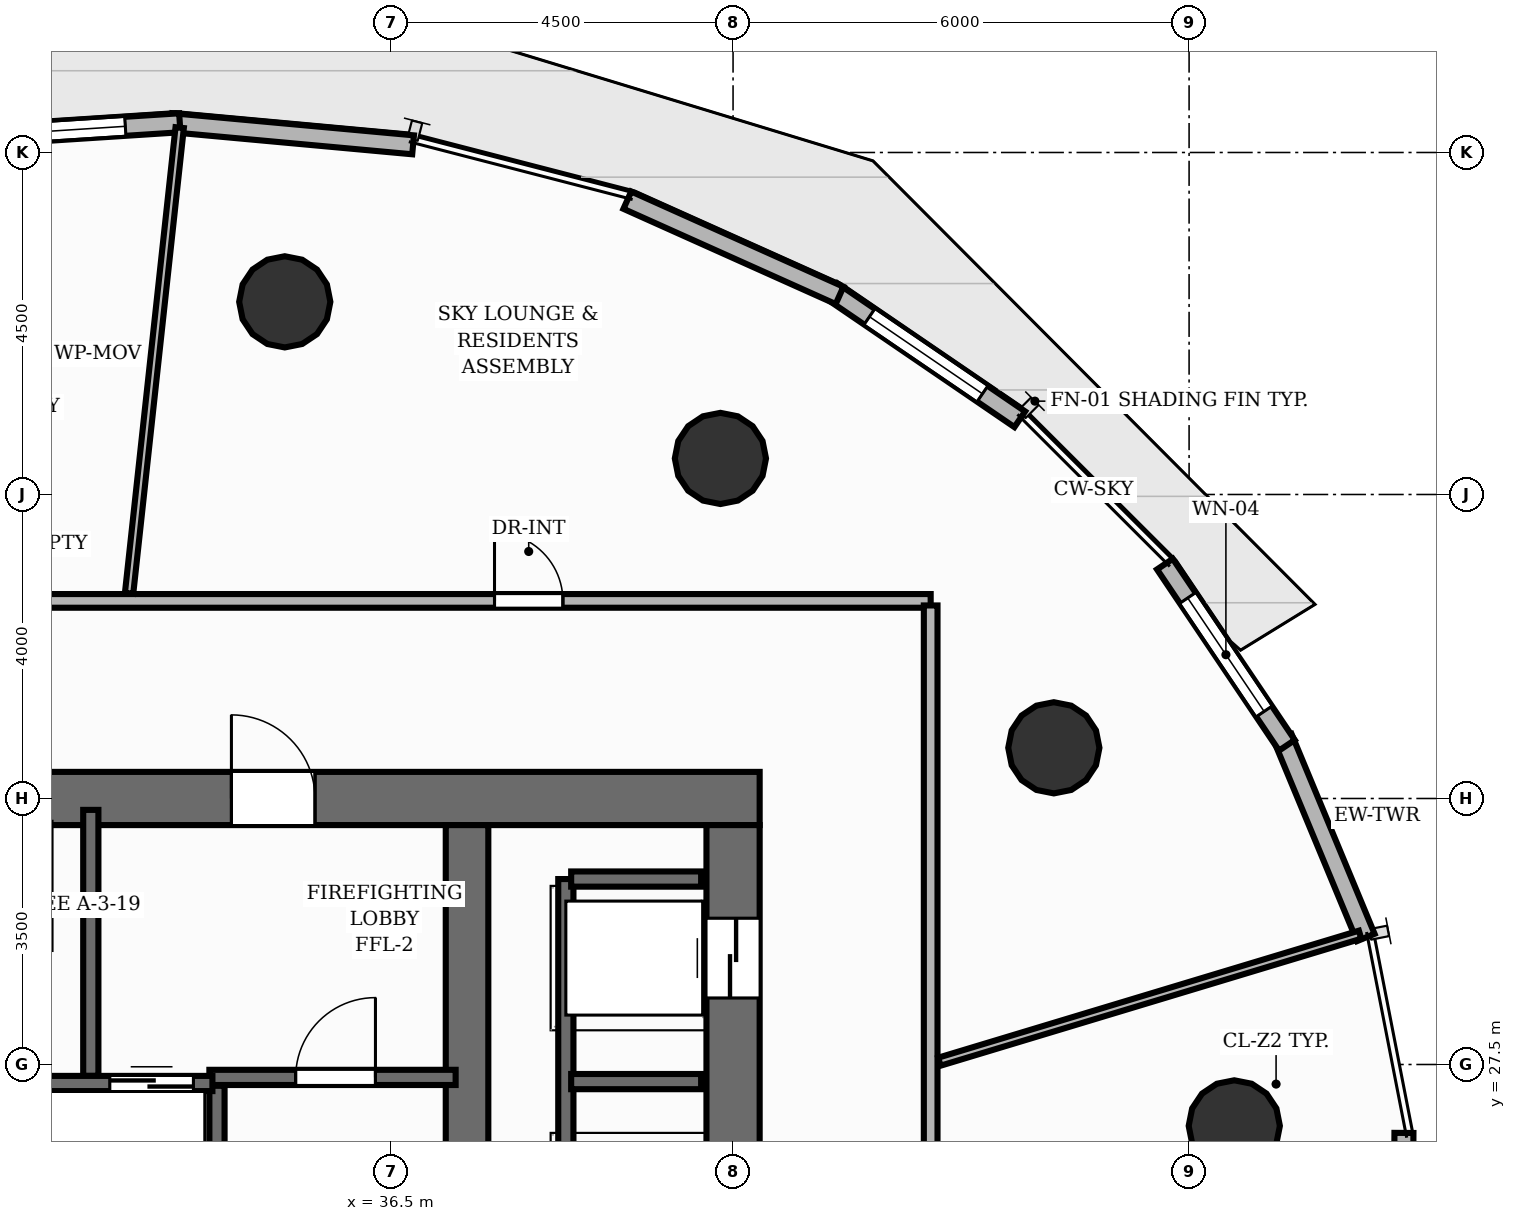
"""IFC4 building model, lengths in metres.
Left out: names, types, materials, properties, quantities, classifications, styles, units other than length and angle.
Written with IfcOpenShell. Run it as: python <this file> out.ifc"""

import sys

from ifc_helpers import new_model, si_unit, direction, frame, frame_2d, origin, origin_2d, place, context, subcontext, project, spatial, rectangle, circle, extrude, element, fill, save


model = new_model("IFC4")
c1 = context("Model", 3, precision=1e-05, world=origin(), true_north=direction((0.0, 1.0)))
c2 = subcontext(c1, "Body", "Model", "MODEL_VIEW")
j1 = project(units=[si_unit("LENGTHUNIT", "METRE"), si_unit("PLANEANGLEUNIT", "RADIAN")], contexts=[c1])
p1 = place(None, origin())
s1 = spatial("IfcSite", under=j1, at=p1, CompositionType="ELEMENT")
p2 = place(p1, origin())
s2 = spatial("IfcBuilding", under=s1, at=p2, CompositionType="ELEMENT")
p3 = place(p2, frame((0.0, 0.0, 70.88)))
s3 = spatial("IfcBuildingStorey", under=s2, at=p3, CompositionType="ELEMENT", Elevation=70.88)
p4 = place(p3, frame((22.65, 31.0, 0.0), z_axis=(0.0, 0.0, 1.0), x_axis=(1.0, 0.0, 0.0)))
e1 = element("IfcWall", 1, at=p4, inside=s3, PredefinedType="SHEAR", context=c2, shape_type="SweptSolid", body=[
    extrude(rectangle(XDim=18.7, YDim=0.7, at=frame_2d((9.35, 0.0))), origin(), (0.0, 0.0, 1.0), 3.2),
])
p5 = place(p4, frame((11.75, 0.0, 0.0)))
e2 = element("IfcOpeningElement", 2, at=p5, cuts=e1, PredefinedType="OPENING", context=c2, shape_type="SweptSolid", body=[
    extrude(rectangle(XDim=1.1, YDim=2.15, at=frame_2d((0.55, 1.075))), frame((0.0, 0.36, 0.0), z_axis=(0.0, -1.0, 0.0), x_axis=(1.0, 0.0, 0.0)), (0.0, 0.0, 1.0), 0.72),
])
p6 = place(p3, frame((41.0, 17.35, 0.0), z_axis=(0.0, 0.0, 1.0), x_axis=(0.0, 1.0, 0.0)))
e3 = element("IfcWall", 3, at=p6, inside=s3, PredefinedType="SHEAR", context=c2, shape_type="SweptSolid", body=[
    extrude(rectangle(XDim=13.3, YDim=0.7, at=frame_2d((6.65, 0.0))), origin(), (0.0, 0.0, 1.0), 3.2),
])
p7 = place(p6, frame((1.225, 0.0, 0.0)))
e4 = element("IfcOpeningElement", 4, at=p7, cuts=e3, PredefinedType="OPENING", context=c2, shape_type="SweptSolid", body=[
    extrude(rectangle(XDim=1.05, YDim=2.15, at=frame_2d((0.525, 1.075))), frame((0.0, 0.36, 0.0), z_axis=(0.0, -1.0, 0.0), x_axis=(1.0, 0.0, 0.0)), (0.0, 0.0, 1.0), 0.72),
])
p8 = place(p6, frame((4.475, 0.0, 0.0)))
e5 = element("IfcOpeningElement", 5, at=p8, cuts=e3, PredefinedType="OPENING", context=c2, shape_type="SweptSolid", body=[
    extrude(rectangle(XDim=1.05, YDim=2.15, at=frame_2d((0.525, 1.075))), frame((0.0, 0.36, 0.0), z_axis=(0.0, -1.0, 0.0), x_axis=(1.0, 0.0, 0.0)), (0.0, 0.0, 1.0), 0.72),
])
p9 = place(p6, frame((7.775, 0.0, 0.0)))
e6 = element("IfcOpeningElement", 6, at=p9, cuts=e3, PredefinedType="OPENING", context=c2, shape_type="SweptSolid", body=[
    extrude(rectangle(XDim=1.05, YDim=2.15, at=frame_2d((0.525, 1.075))), frame((0.0, 0.36, 0.0), z_axis=(0.0, -1.0, 0.0), x_axis=(1.0, 0.0, 0.0)), (0.0, 0.0, 1.0), 0.72),
])
p10 = place(p6, frame((11.025, 0.0, 0.0)))
e7 = element("IfcOpeningElement", 7, at=p10, cuts=e3, PredefinedType="OPENING", context=c2, shape_type="SweptSolid", body=[
    extrude(rectangle(XDim=1.05, YDim=2.15, at=frame_2d((0.525, 1.075))), frame((0.0, 0.36, 0.0), z_axis=(0.0, -1.0, 0.0), x_axis=(1.0, 0.0, 0.0)), (0.0, 0.0, 1.0), 0.72),
])
p11 = place(p3, frame((37.5, 17.35, 0.0), z_axis=(0.0, 0.0, 1.0), x_axis=(0.0, 1.0, 0.0)))
e8 = element("IfcWall", 8, at=p11, inside=s3, PredefinedType="SHEAR", context=c2, shape_type="SweptSolid", body=[
    extrude(rectangle(XDim=13.3, YDim=0.56, at=frame_2d((6.65, 0.0))), origin(), (0.0, 0.0, 1.0), 3.2),
])
for number, where, z_axis, x_axis in (
    (9, (47.594, 26.692, 0.0), (0.0, 0.0, 1.0), (1.0, 0.0, 0.0)),
    (10, (45.22, 31.667, 0.0), (0.0, 0.0, 1.0), (1.0, 0.0, 0.0)),
    (11, (40.833, 35.474, 0.0), (0.0, 0.0, 1.0), (1.0, 0.0, 0.0)),
    (12, (35.102, 37.535, 0.0), (0.0, 0.0, 1.0), (1.0, 0.0, 0.0)),
):
    element("IfcColumn", number, at=place(p3, frame(where, z_axis=z_axis, x_axis=x_axis)), inside=s3, PredefinedType="COLUMN", context=c2, shape_type="SweptSolid", body=[
        extrude(circle(Radius=0.6, at=origin_2d()), origin(), (0.0, 0.0, 1.0), 3.2),
    ])
p12 = place(p3, frame((48.233, 31.801, 0.0), z_axis=(0.0, 0.0, 1.0), x_axis=(0.383525326811, -0.923530358838, 0.0)))
e13 = element("IfcWall", 13, at=p12, inside=s3, PredefinedType="SOLIDWALL", context=c2, shape_type="SweptSolid", body=[
    extrude(rectangle(XDim=2.847, YDim=0.25, at=frame_2d((1.424, 0.0))), origin(), (0.0, 0.0, 1.0), 2.96),
])
p13 = place(p3, frame((46.682, 34.084, 0.0), z_axis=(0.0, 0.0, 1.0), x_axis=(0.558458439807, -0.829532501478, 0.0)))
e14 = element("IfcWall", 14, at=p13, inside=s3, PredefinedType="SOLIDWALL", context=c2, shape_type="SweptSolid", body=[
    extrude(rectangle(XDim=2.874, YDim=0.25, at=frame_2d((1.437, 0.0))), origin(), (0.0, 0.0, 1.0), 2.96),
])
p14 = place(p13, frame((0.537, 0.0, 0.85)))
e15 = element("IfcOpeningElement", 15, at=p14, cuts=e14, PredefinedType="OPENING", context=c2, shape_type="SweptSolid", body=[
    extrude(rectangle(XDim=1.8, YDim=1.37, at=frame_2d((0.9, 0.685))), frame((0.0, 0.135, 0.0), z_axis=(0.0, -1.0, 0.0), x_axis=(1.0, 0.0, 0.0)), (0.0, 0.0, 1.0), 0.27),
])
p15 = place(p3, frame((42.304, 37.674, 0.0), z_axis=(0.0, 0.0, 1.0), x_axis=(0.825967987646, -0.56371702421, 0.0)))
e16 = element("IfcWall", 16, at=p15, inside=s3, PredefinedType="SOLIDWALL", context=c2, shape_type="SweptSolid", body=[
    extrude(rectangle(XDim=2.988, YDim=0.25, at=frame_2d((1.494, 0.0))), origin(), (0.0, 0.0, 1.0), 2.96),
])
p16 = place(p15, frame((0.594, 0.0, 0.85)))
e17 = element("IfcOpeningElement", 17, at=p16, cuts=e16, PredefinedType="OPENING", context=c2, shape_type="SweptSolid", body=[
    extrude(rectangle(XDim=1.8, YDim=2.0, at=frame_2d((0.9, 1.0))), frame((0.0, 0.135, 0.0), z_axis=(0.0, -1.0, 0.0), x_axis=(1.0, 0.0, 0.0)), (0.0, 0.0, 1.0), 0.27),
])
p17 = place(p3, frame((39.609, 38.873, 0.0), z_axis=(0.0, 0.0, 1.0), x_axis=(0.912401485772, -0.40929638254, 0.0)))
e18 = element("IfcWall", 18, at=p17, inside=s3, PredefinedType="SOLIDWALL", context=c2, shape_type="SweptSolid", body=[
    extrude(rectangle(XDim=3.061, YDim=0.25, at=frame_2d((1.53, 0.0))), origin(), (0.0, 0.0, 1.0), 2.96),
])
p18 = place(p3, frame((33.612, 39.892, 0.0), z_axis=(0.0, 0.0, 1.0), x_axis=(0.9958277433, -0.091252976247, 0.0)))
e19 = element("IfcWall", 19, at=p18, inside=s3, PredefinedType="SOLIDWALL", context=c2, shape_type="SweptSolid", body=[
    extrude(rectangle(XDim=3.192, YDim=0.25, at=frame_2d((1.596, 0.0))), origin(), (0.0, 0.0, 1.0), 2.96),
])
p19 = place(p3, frame((30.491, 39.682, 0.0), z_axis=(0.0, 0.0, 1.0), x_axis=(0.997907602465, 0.064656143896, 0.0)))
e20 = element("IfcWall", 20, at=p19, inside=s3, PredefinedType="SOLIDWALL", context=c2, shape_type="SweptSolid", body=[
    extrude(rectangle(XDim=3.236, YDim=0.25, at=frame_2d((1.618, 0.0))), origin(), (0.0, 0.0, 1.0), 2.96),
])
p20 = place(p19, frame((0.718, 0.0, 0.85)))
e21 = element("IfcOpeningElement", 21, at=p20, cuts=e20, PredefinedType="OPENING", context=c2, shape_type="SweptSolid", body=[
    extrude(rectangle(XDim=1.8, YDim=2.0, at=frame_2d((0.9, 1.0))), frame((0.0, 0.135, 0.0), z_axis=(0.0, -1.0, 0.0), x_axis=(1.0, 0.0, 0.0)), (0.0, 0.0, 1.0), 0.27),
])
p21 = place(p3, frame((49.827, 26.6, 0.0), z_axis=(0.0, 0.0, 1.0), x_axis=(-0.006201036057, -0.999980773391, 0.0)))
e22 = element("IfcWall", 22, at=p21, inside=s3, PredefinedType="SOLIDWALL", context=c2, shape_type="SweptSolid", body=[
    extrude(rectangle(XDim=2.874, YDim=0.25, at=frame_2d((1.437, 0.0))), origin(), (0.0, 0.0, 1.0), 2.96),
])
p22 = place(p3, frame((34.21, 20.78, 0.0), z_axis=(0.0, 0.0, 1.0), x_axis=(0.0, 1.0, 0.0)))
e23 = element("IfcWall", 23, at=p22, inside=s3, PredefinedType="SHEAR", context=c2, shape_type="SweptSolid", body=[
    extrude(rectangle(XDim=6.44, YDim=0.2, at=frame_2d((3.22, 0.0))), origin(), (0.0, 0.0, 1.0), 3.2),
])
p23 = place(p3, frame((34.11, 27.33, 0.0), z_axis=(0.0, 0.0, 1.0), x_axis=(1.0, 0.0, 0.0)))
e24 = element("IfcWall", 24, at=p23, inside=s3, PredefinedType="SHEAR", context=c2, shape_type="SweptSolid", body=[
    extrude(rectangle(XDim=3.24, YDim=0.2, at=frame_2d((1.62, 0.0))), origin(), (0.0, 0.0, 1.0), 3.2),
])
p24 = place(p23, frame((1.135, 0.0, 0.0)))
e25 = element("IfcOpeningElement", 25, at=p24, cuts=e24, PredefinedType="OPENING", context=c2, shape_type="SweptSolid", body=[
    extrude(rectangle(XDim=1.05, YDim=2.15, at=frame_2d((0.525, 1.075))), frame((0.0, 0.11, 0.0), z_axis=(0.0, -1.0, 0.0), x_axis=(1.0, 0.0, 0.0)), (0.0, 0.0, 1.0), 0.22),
])
p25 = place(p3, frame((32.55, 27.35, 0.0), z_axis=(0.0, 0.0, 1.0), x_axis=(0.0, 1.0, 0.0)))
e26 = element("IfcWall", 26, at=p25, inside=s3, PredefinedType="SHEAR", context=c2, shape_type="SweptSolid", body=[
    extrude(rectangle(XDim=3.5, YDim=0.2, at=frame_2d((1.75, 0.0))), origin(), (0.0, 0.0, 1.0), 3.2),
])
p26 = place(p3, frame((31.85, 27.25, 0.0), z_axis=(0.0, 0.0, 1.0), x_axis=(1.0, 0.0, 0.0)))
e27 = element("IfcWall", 27, at=p26, inside=s3, PredefinedType="SHEAR", context=c2, shape_type="SweptSolid", body=[
    extrude(rectangle(XDim=2.3, YDim=0.2, at=frame_2d((1.15, 0.0))), origin(), (0.0, 0.0, 1.0), 3.2),
])
p27 = place(p26, frame((0.95, 0.0, 0.0)))
e28 = element("IfcOpeningElement", 28, at=p27, cuts=e27, PredefinedType="OPENING", context=c2, shape_type="SweptSolid", body=[
    extrude(rectangle(XDim=1.1, YDim=2.15, at=frame_2d((0.55, 1.075))), frame((0.0, 0.11, 0.0), z_axis=(0.0, -1.0, 0.0), x_axis=(1.0, 0.0, 0.0)), (0.0, 0.0, 1.0), 0.22),
])
p28 = place(p3, frame((38.8, 18.06, 0.0), z_axis=(0.0, 0.0, 1.0), x_axis=(0.0, 1.0, 0.0)))
e29 = element("IfcWall", 29, at=p28, inside=s3, PredefinedType="SHEAR", context=c2, shape_type="SweptSolid", body=[
    extrude(rectangle(XDim=11.88, YDim=0.2, at=frame_2d((5.94, 0.0))), origin(), (0.0, 0.0, 1.0), 3.2),
])
for number, where, z_axis, x_axis in (
    (30, (38.87, 29.94, 0.0), (0.0, 0.0, 1.0), (1.0, 0.0, 0.0)),
    (31, (38.87, 27.275, 0.0), (0.0, 0.0, 1.0), (1.0, 0.0, 0.0)),
):
    element("IfcWall", number, at=place(p3, frame(where, z_axis=z_axis, x_axis=x_axis)), inside=s3, PredefinedType="SHEAR", context=c2, shape_type="SweptSolid", body=[
        extrude(rectangle(XDim=1.71, YDim=0.2, at=frame_2d((0.855, 0.0))), origin(), (0.0, 0.0, 1.0), 3.2),
    ])
p29 = place(p3, frame((20.4, 33.6, 0.0), z_axis=(0.0, 0.0, 1.0), x_axis=(1.0, 0.0, 0.0)))
e32 = element("IfcWall", 32, at=p29, inside=s3, PredefinedType="PARTITIONING", context=c2, shape_type="SweptSolid", body=[
    extrude(rectangle(XDim=23.2, YDim=0.18, at=frame_2d((11.6, 0.0))), origin(), (0.0, 0.0, 1.0), 2.955),
])
p30 = place(p29, frame((17.461, 0.0, 0.0)))
e33 = element("IfcOpeningElement", 33, at=p30, cuts=e32, PredefinedType="OPENING", context=c2, shape_type="SweptSolid", body=[
    extrude(rectangle(XDim=0.9, YDim=2.1, at=frame_2d((0.45, 1.05))), frame((0.0, 0.1, 0.0), z_axis=(0.0, -1.0, 0.0), x_axis=(1.0, 0.0, 0.0)), (0.0, 0.0, 1.0), 0.2),
])
p31 = place(p29, frame((5.882, 0.0, 0.0)))
e34 = element("IfcOpeningElement", 34, at=p31, cuts=e32, PredefinedType="OPENING", context=c2, shape_type="SweptSolid", body=[
    extrude(rectangle(XDim=0.9, YDim=2.1, at=frame_2d((0.45, 1.05))), frame((0.0, 0.1, 0.0), z_axis=(0.0, -1.0, 0.0), x_axis=(1.0, 0.0, 0.0)), (0.0, 0.0, 1.0), 0.2),
])
p32 = place(p3, frame((43.6, 33.54, 0.0), z_axis=(0.0, 0.0, 1.0), x_axis=(0.0, -1.0, 0.0)))
e35 = element("IfcWall", 35, at=p32, inside=s3, PredefinedType="PARTITIONING", context=c2, shape_type="SweptSolid", body=[
    extrude(rectangle(XDim=19.14, YDim=0.18, at=frame_2d((9.57, 0.0))), origin(), (0.0, 0.0, 1.0), 2.955),
])
p33 = place(p32, frame((12.128, 0.0, 0.0)))
e36 = element("IfcOpeningElement", 36, at=p33, cuts=e35, PredefinedType="OPENING", context=c2, shape_type="SweptSolid", body=[
    extrude(rectangle(XDim=0.9, YDim=2.1, at=frame_2d((0.45, 1.05))), frame((0.0, 0.1, 0.0), z_axis=(0.0, -1.0, 0.0), x_axis=(1.0, 0.0, 0.0)), (0.0, 0.0, 1.0), 0.2),
])
p34 = place(p3, frame((33.054, 33.699, 0.0), z_axis=(0.0, 0.0, 1.0), x_axis=(0.108014076948, 0.994149364623, 0.0)))
e37 = element("IfcWall", 37, at=p34, inside=s3, PredefinedType="MOVABLE", context=c2, shape_type="SweptSolid", body=[
    extrude(rectangle(XDim=6.164, YDim=0.11, at=frame_2d((3.082, 0.0))), origin(), (0.0, 0.0, 1.0), 2.955),
])
p35 = place(p3, frame((49.25, 29.208, 0.0), z_axis=(0.0, 0.0, 1.0), x_axis=(-0.957320436523, -0.289028686838, 0.0)))
e38 = element("IfcWall", 38, at=p35, inside=s3, PredefinedType="MOVABLE", context=c2, shape_type="SweptSolid", body=[
    extrude(rectangle(XDim=5.782, YDim=0.11, at=frame_2d((2.891, 0.0))), origin(), (0.0, 0.0, 1.0), 2.642),
])
p36 = place(p14, origin())
e39 = element("IfcWindow", 39, at=p36, inside=s3, PartitioningType="SINGLE_PANEL", PredefinedType="WINDOW", context=c2, shape_type="SweptSolid", body=[
    extrude(rectangle(XDim=1.8, YDim=1.37, at=frame_2d((0.9, 0.685))), frame((0.0, 0.03, 0.0), z_axis=(0.0, -1.0, 0.0), x_axis=(1.0, 0.0, 0.0)), (0.0, 0.0, 1.0), 0.06),
])
fill(e15, e39)
p37 = place(p16, origin())
e40 = element("IfcWindow", 40, at=p37, inside=s3, PartitioningType="SINGLE_PANEL", PredefinedType="WINDOW", context=c2, shape_type="SweptSolid", body=[
    extrude(rectangle(XDim=1.8, YDim=2.0, at=frame_2d((0.9, 1.0))), frame((0.0, 0.03, 0.0), z_axis=(0.0, -1.0, 0.0), x_axis=(1.0, 0.0, 0.0)), (0.0, 0.0, 1.0), 0.06),
])
fill(e17, e40)
p38 = place(p20, origin())
e41 = element("IfcWindow", 41, at=p38, inside=s3, PartitioningType="SINGLE_PANEL", PredefinedType="WINDOW", context=c2, shape_type="SweptSolid", body=[
    extrude(rectangle(XDim=1.8, YDim=2.0, at=frame_2d((0.9, 1.0))), frame((0.0, 0.03, 0.0), z_axis=(0.0, -1.0, 0.0), x_axis=(1.0, 0.0, 0.0)), (0.0, 0.0, 1.0), 0.06),
])
fill(e21, e41)
p39 = place(p24, origin())
e42 = element("IfcDoor", 42, at=p39, inside=s3, OperationType="SINGLE_SWING_RIGHT", PredefinedType="DOOR", context=c2, shape_type="SweptSolid", body=[
    extrude(rectangle(XDim=1.05, YDim=2.15, at=frame_2d((0.525, 1.075))), frame((0.0, 0.025, 0.0), z_axis=(0.0, -1.0, 0.0), x_axis=(1.0, 0.0, 0.0)), (0.0, 0.0, 1.0), 0.05),
])
fill(e25, e42)
p40 = place(p5, origin())
e43 = element("IfcDoor", 43, at=p40, inside=s3, OperationType="SINGLE_SWING_LEFT", PredefinedType="DOOR", context=c2, shape_type="SweptSolid", body=[
    extrude(rectangle(XDim=1.1, YDim=2.15, at=frame_2d((0.55, 1.075))), frame((0.0, 0.025, 0.0), z_axis=(0.0, -1.0, 0.0), x_axis=(1.0, 0.0, 0.0)), (0.0, 0.0, 1.0), 0.05),
])
fill(e2, e43)
p41 = place(p27, origin())
e44 = element("IfcDoor", 44, at=p41, inside=s3, OperationType="DOUBLE_DOOR_SLIDING", PredefinedType="DOOR", context=c2, shape_type="SweptSolid", body=[
    extrude(rectangle(XDim=1.1, YDim=2.15, at=frame_2d((0.55, 1.075))), frame((0.0, 0.025, 0.0), z_axis=(0.0, -1.0, 0.0), x_axis=(1.0, 0.0, 0.0)), (0.0, 0.0, 1.0), 0.05),
])
fill(e28, e44)
p42 = place(p10, origin())
e45 = element("IfcDoor", 45, at=p42, inside=s3, OperationType="DOUBLE_DOOR_SLIDING", PredefinedType="DOOR", context=c2, shape_type="SweptSolid", body=[
    extrude(rectangle(XDim=1.05, YDim=2.15, at=frame_2d((0.525, 1.075))), frame((0.0, 0.025, 0.0), z_axis=(0.0, -1.0, 0.0), x_axis=(1.0, 0.0, 0.0)), (0.0, 0.0, 1.0), 0.05),
])
fill(e7, e45)
p43 = place(p30, origin())
e46 = element("IfcDoor", 46, at=p43, inside=s3, OperationType="SINGLE_SWING_LEFT", PredefinedType="DOOR", context=c2, shape_type="SweptSolid", body=[
    extrude(rectangle(XDim=0.9, YDim=2.1, at=frame_2d((0.45, 1.05))), frame((0.0, 0.025, 0.0), z_axis=(0.0, -1.0, 0.0), x_axis=(1.0, 0.0, 0.0)), (0.0, 0.0, 1.0), 0.05),
])
fill(e33, e46)
save(model, sys.argv[1])
